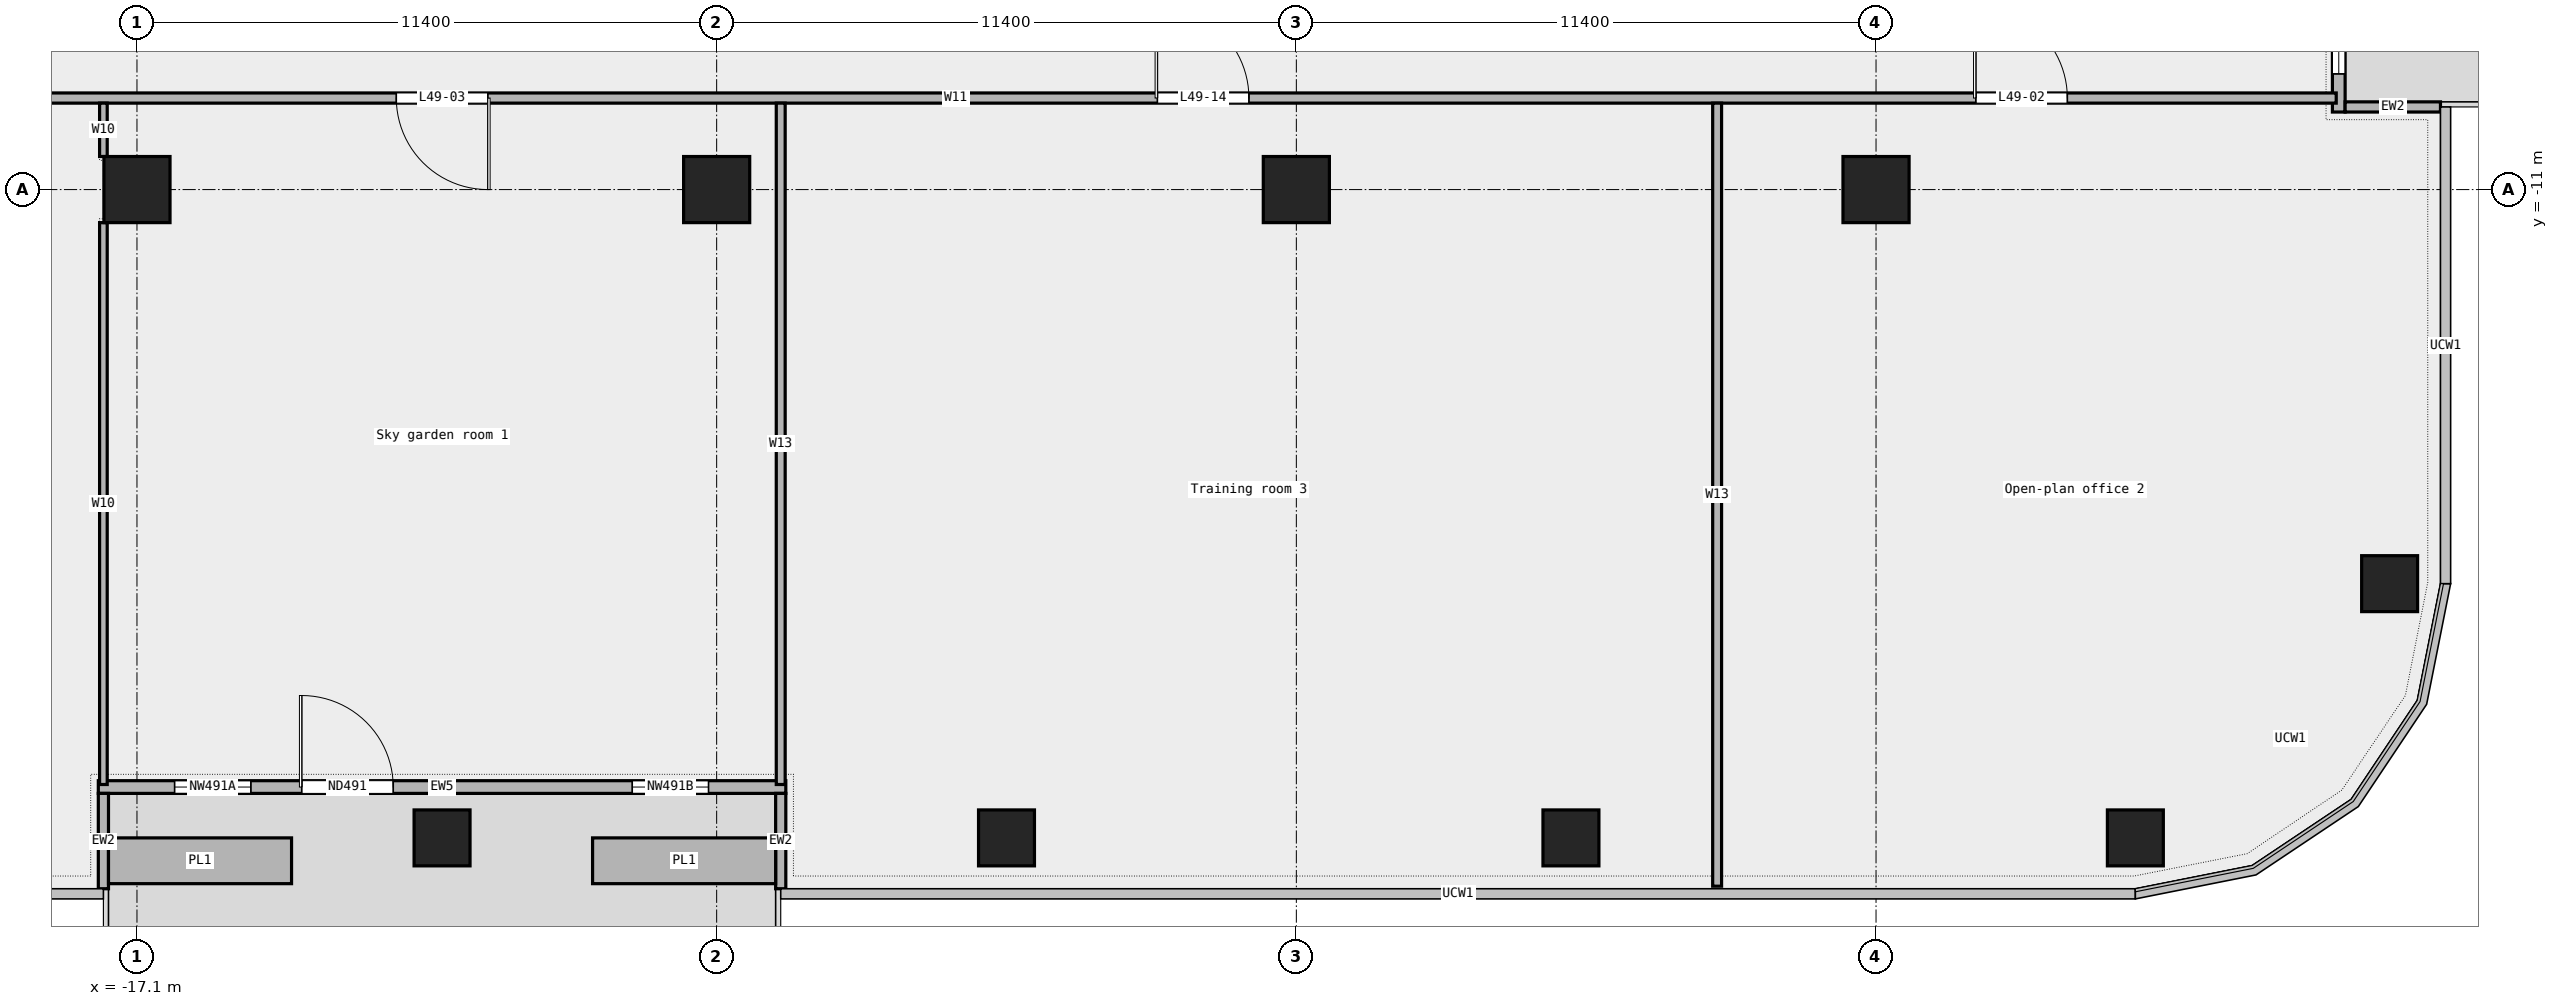
"""IFC4 building model, lengths in metres.
Left out: names, types, materials, properties, quantities, classifications, styles, units other than length and angle.
Written with IfcOpenShell. Run it as: python <this file> out.ifc"""

import sys

from ifc_helpers import new_model, si_unit, direction, frame, frame_2d, origin, origin_2d, place, context, subcontext, project, spatial, rectangle, extrude, element, fill, save


model = new_model("IFC4")
c1 = context("Model", 3, precision=1e-05, world=origin(), true_north=direction((0.0, 1.0)))
c2 = subcontext(c1, "Body", "Model", "MODEL_VIEW")
j1 = project(units=[si_unit("LENGTHUNIT", "METRE"), si_unit("PLANEANGLEUNIT", "RADIAN")], contexts=[c1])
p1 = place(None, origin())
s1 = spatial("IfcSite", under=j1, at=p1, CompositionType="ELEMENT")
p2 = place(p1, origin())
s2 = spatial("IfcBuilding", under=s1, at=p2, CompositionType="ELEMENT")
p3 = place(p2, frame((0.0, 0.0, 231.0)))
s3 = spatial("IfcBuildingStorey", under=s2, at=p3, CompositionType="ELEMENT", Elevation=231.0)
for number, where, z_axis, x_axis in (
    (1, (-11.1, -23.75, 0.0), (0.0, 0.0, 1.0), (1.0, 0.0, 0.0)),
    (2, (0.0, -23.75, 0.0), (0.0, 0.0, 1.0), (1.0, 0.0, 0.0)),
    (3, (11.1, -23.75, 0.0), (0.0, 0.0, 1.0), (1.0, 0.0, 0.0)),
    (4, (22.2, -23.75, 0.0), (0.0, 0.0, 1.0), (1.0, 0.0, 0.0)),
    (5, (27.2, -18.75, 0.0), (0.0, 0.0, 1.0), (1.0, 0.0, 0.0)),
):
    element("IfcColumn", number, at=place(p3, frame(where, z_axis=z_axis, x_axis=x_axis)), inside=s3, PredefinedType="COLUMN", context=c2, shape_type="SweptSolid", body=[
        extrude(rectangle(XDim=1.1, YDim=1.1, at=origin_2d()), origin(), (0.0, 0.0, 1.0), 3.6),
    ])
for number, where, z_axis, x_axis in (
    (6, (-17.1, -11.0, 0.0), (0.0, 0.0, 1.0), (1.0, 0.0, 0.0)),
    (7, (-5.7, -11.0, 0.0), (0.0, 0.0, 1.0), (1.0, 0.0, 0.0)),
    (8, (5.7, -11.0, 0.0), (0.0, 0.0, 1.0), (1.0, 0.0, 0.0)),
    (9, (17.1, -11.0, 0.0), (0.0, 0.0, 1.0), (1.0, 0.0, 0.0)),
):
    element("IfcColumn", number, at=place(p3, frame(where, z_axis=z_axis, x_axis=x_axis)), inside=s3, PredefinedType="COLUMN", context=c2, shape_type="SweptSolid", body=[
        extrude(rectangle(XDim=1.3, YDim=1.3, at=origin_2d()), origin(), (0.0, 0.0, 1.0), 3.6),
    ])
p4 = place(p3, frame((-17.86, -22.75, 0.0), z_axis=(0.0, 0.0, 1.0), x_axis=(1.0, 0.0, 0.0)))
e10 = element("IfcWall", 10, at=p4, inside=s3, PredefinedType="STANDARD", context=c2, shape_type="SweptSolid", body=[
    extrude(rectangle(XDim=13.52, YDim=0.25, at=frame_2d((6.76, 0.0))), origin(), (0.0, 0.0, 1.0), 3.6),
])
p5 = place(p4, frame((1.5, 0.0, 0.45)))
e11 = element("IfcOpeningElement", 11, at=p5, cuts=e10, PredefinedType="OPENING", context=c2, shape_type="SweptSolid", body=[
    extrude(rectangle(XDim=1.5, YDim=2.4, at=frame_2d((0.75, 1.2))), frame((0.0, 0.137, 0.0), z_axis=(0.0, -1.0, 0.0), x_axis=(1.0, 0.0, 0.0)), (0.0, 0.0, 1.0), 0.274),
])
p6 = place(p4, frame((4.0, 0.0, 0.0)))
e12 = element("IfcOpeningElement", 12, at=p6, cuts=e10, PredefinedType="OPENING", context=c2, shape_type="SweptSolid", body=[
    extrude(rectangle(XDim=1.8, YDim=2.4, at=frame_2d((0.9, 1.2))), frame((0.0, 0.137, 0.0), z_axis=(0.0, -1.0, 0.0), x_axis=(1.0, 0.0, 0.0)), (0.0, 0.0, 1.0), 0.274),
])
p7 = place(p4, frame((10.5, 0.0, 0.45)))
e13 = element("IfcOpeningElement", 13, at=p7, cuts=e10, PredefinedType="OPENING", context=c2, shape_type="SweptSolid", body=[
    extrude(rectangle(XDim=1.5, YDim=2.4, at=frame_2d((0.75, 1.2))), frame((0.0, 0.137, 0.0), z_axis=(0.0, -1.0, 0.0), x_axis=(1.0, 0.0, 0.0)), (0.0, 0.0, 1.0), 0.274),
])
for number, where, z_axis, x_axis in (
    (14, (-17.76, -24.75, 0.0), (0.0, 0.0, 1.0), (0.0, 1.0, 0.0)),
    (15, (-4.44, -24.75, 0.0), (0.0, 0.0, 1.0), (0.0, 1.0, 0.0)),
):
    element("IfcWall", number, at=place(p3, frame(where, z_axis=z_axis, x_axis=x_axis)), inside=s3, PredefinedType="STANDARD", context=c2, shape_type="SweptSolid", body=[
        extrude(rectangle(XDim=1.875, YDim=0.2, at=frame_2d((0.938, 0.0))), origin(), (0.0, 0.0, 1.0), 3.6),
    ])
for number, where, z_axis, x_axis in (
    (16, (-17.66, -24.2, 0.0), (0.0, 0.0, 1.0), (1.0, 0.0, 0.0)),
    (17, (-8.14, -24.2, 0.0), (0.0, 0.0, 1.0), (1.0, 0.0, 0.0)),
):
    element("IfcWall", number, at=place(p3, frame(where, z_axis=z_axis, x_axis=x_axis)), inside=s3, PredefinedType="STANDARD", context=c2, shape_type="SweptSolid", body=[
        extrude(rectangle(XDim=3.6, YDim=0.9, at=frame_2d((1.8, 0.0))), origin(), (0.0, 0.0, 1.0), 0.7),
    ])
p8 = place(p3, frame((26.2, -9.475, 0.0), z_axis=(0.0, 0.0, 1.0), x_axis=(0.0, 1.0, 0.0)))
e18 = element("IfcWall", 18, at=p8, inside=s3, PredefinedType="STANDARD", context=c2, shape_type="SweptSolid", body=[
    extrude(rectangle(XDim=14.263, YDim=0.25, at=frame_2d((7.131, 0.0))), origin(), (0.0, 0.0, 1.0), 3.6),
])
p9 = place(p8, frame((0.75, 0.0, 0.45)))
e19 = element("IfcOpeningElement", 19, at=p9, cuts=e18, PredefinedType="OPENING", context=c2, shape_type="SweptSolid", body=[
    extrude(rectangle(XDim=1.5, YDim=2.4, at=frame_2d((0.75, 1.2))), frame((0.0, 0.137, 0.0), z_axis=(0.0, -1.0, 0.0), x_axis=(1.0, 0.0, 0.0)), (0.0, 0.0, 1.0), 0.274),
])
p10 = place(p8, frame((6.25, 0.0, 0.0)))
e20 = element("IfcOpeningElement", 20, at=p10, cuts=e18, PredefinedType="OPENING", context=c2, shape_type="SweptSolid", body=[
    extrude(rectangle(XDim=1.8, YDim=2.4, at=frame_2d((0.9, 1.2))), frame((0.0, 0.137, 0.0), z_axis=(0.0, -1.0, 0.0), x_axis=(1.0, 0.0, 0.0)), (0.0, 0.0, 1.0), 0.274),
])
p11 = place(p8, frame((11.0, 0.0, 0.45)))
e21 = element("IfcOpeningElement", 21, at=p11, cuts=e18, PredefinedType="OPENING", context=c2, shape_type="SweptSolid", body=[
    extrude(rectangle(XDim=1.5, YDim=2.4, at=frame_2d((0.75, 1.2))), frame((0.0, 0.137, 0.0), z_axis=(0.0, -1.0, 0.0), x_axis=(1.0, 0.0, 0.0)), (0.0, 0.0, 1.0), 0.274),
])
p12 = place(p3, frame((28.2, -9.375, 0.0), z_axis=(0.0, 0.0, 1.0), x_axis=(-1.0, 0.0, 0.0)))
e22 = element("IfcWall", 22, at=p12, inside=s3, PredefinedType="STANDARD", context=c2, shape_type="SweptSolid", body=[
    extrude(rectangle(XDim=1.875, YDim=0.2, at=frame_2d((0.938, 0.0))), origin(), (0.0, 0.0, 1.0), 3.6),
])
p13 = place(p3, frame((-28.15, -9.2, 0.0), z_axis=(0.0, 0.0, 1.0), x_axis=(1.0, 0.0, 0.0)))
e23 = element("IfcWall", 23, at=p13, inside=s3, PredefinedType="PARTITIONING", context=c2, shape_type="SweptSolid", body=[
    extrude(rectangle(XDim=54.3, YDim=0.2, at=frame_2d((27.15, 0.0))), origin(), (0.0, 0.0, 1.0), 3.6),
])
p14 = place(p13, frame((47.212, 0.0, 0.0)))
e24 = element("IfcOpeningElement", 24, at=p14, cuts=e23, PredefinedType="OPENING", context=c2, shape_type="SweptSolid", body=[
    extrude(rectangle(XDim=1.8, YDim=2.1, at=frame_2d((0.9, 1.05))), frame((0.0, 0.112, 0.0), z_axis=(0.0, -1.0, 0.0), x_axis=(1.0, 0.0, 0.0)), (0.0, 0.0, 1.0), 0.224),
])
p15 = place(p13, frame((16.15, 0.0, 0.0)))
e25 = element("IfcOpeningElement", 25, at=p15, cuts=e23, PredefinedType="OPENING", context=c2, shape_type="SweptSolid", body=[
    extrude(rectangle(XDim=1.8, YDim=2.1, at=frame_2d((0.9, 1.05))), frame((0.0, 0.112, 0.0), z_axis=(0.0, -1.0, 0.0), x_axis=(1.0, 0.0, 0.0)), (0.0, 0.0, 1.0), 0.224),
])
p16 = place(p13, frame((4.545, 0.0, 0.0)))
e26 = element("IfcOpeningElement", 26, at=p16, cuts=e23, PredefinedType="OPENING", context=c2, shape_type="SweptSolid", body=[
    extrude(rectangle(XDim=1.5, YDim=2.1, at=frame_2d((0.75, 1.05))), frame((0.0, 0.112, 0.0), z_axis=(0.0, -1.0, 0.0), x_axis=(1.0, 0.0, 0.0)), (0.0, 0.0, 1.0), 0.224),
])
p17 = place(p13, frame((31.117, 0.0, 0.0)))
e27 = element("IfcOpeningElement", 27, at=p17, cuts=e23, PredefinedType="OPENING", context=c2, shape_type="SweptSolid", body=[
    extrude(rectangle(XDim=1.8, YDim=2.1, at=frame_2d((0.9, 1.05))), frame((0.0, 0.112, 0.0), z_axis=(0.0, -1.0, 0.0), x_axis=(1.0, 0.0, 0.0)), (0.0, 0.0, 1.0), 0.224),
])
p18 = place(p3, frame((-17.76, -22.7, 0.0), z_axis=(0.0, 0.0, 1.0), x_axis=(0.0, 1.0, 0.0)))
e28 = element("IfcWall", 28, at=p18, inside=s3, PredefinedType="PARTITIONING", context=c2, shape_type="SweptSolid", body=[
    extrude(rectangle(XDim=11.05, YDim=0.15, at=frame_2d((5.525, 0.0))), origin(), (0.0, 0.0, 1.0), 3.6),
])
p19 = place(p3, frame((-17.76, -10.35, 0.0), z_axis=(0.0, 0.0, 1.0), x_axis=(0.0, 1.0, 0.0)))
e29 = element("IfcWall", 29, at=p19, inside=s3, PredefinedType="PARTITIONING", context=c2, shape_type="SweptSolid", body=[
    extrude(rectangle(XDim=1.05, YDim=0.15, at=frame_2d((0.525, 0.0))), origin(), (0.0, 0.0, 1.0), 3.6),
])
p20 = place(p3, frame((-4.44, -22.7, 0.0), z_axis=(0.0, 0.0, 1.0), x_axis=(0.0, 1.0, 0.0)))
e30 = element("IfcWall", 30, at=p20, inside=s3, PredefinedType="PARTITIONING", context=c2, shape_type="SweptSolid", body=[
    extrude(rectangle(XDim=13.4, YDim=0.175, at=frame_2d((6.7, 0.0))), origin(), (0.0, 0.0, 1.0), 3.6),
])
p21 = place(p3, frame((13.975, -24.7, 0.0), z_axis=(0.0, 0.0, 1.0), x_axis=(0.0, 1.0, 0.0)))
e31 = element("IfcWall", 31, at=p21, inside=s3, PredefinedType="PARTITIONING", context=c2, shape_type="SweptSolid", body=[
    extrude(rectangle(XDim=15.4, YDim=0.175, at=frame_2d((7.7, 0.0))), origin(), (0.0, 0.0, 1.0), 3.6),
])
p22 = place(p5, origin())
e32 = element("IfcWindow", 32, at=p22, inside=s3, PartitioningType="SINGLE_PANEL", PredefinedType="WINDOW", context=c2, shape_type="SweptSolid", body=[
    extrude(rectangle(XDim=1.5, YDim=2.4, at=frame_2d((0.75, 1.2))), frame((0.0, 0.03, 0.0), z_axis=(0.0, -1.0, 0.0), x_axis=(1.0, 0.0, 0.0)), (0.0, 0.0, 1.0), 0.06),
])
fill(e11, e32)
p23 = place(p6, origin())
e33 = element("IfcDoor", 33, at=p23, inside=s3, OperationType="DOUBLE_DOOR_SINGLE_SWING", PredefinedType="DOOR", context=c2, shape_type="SweptSolid", body=[
    extrude(rectangle(XDim=1.8, YDim=2.4, at=frame_2d((0.9, 1.2))), frame((0.0, 0.025, 0.0), z_axis=(0.0, -1.0, 0.0), x_axis=(1.0, 0.0, 0.0)), (0.0, 0.0, 1.0), 0.05),
])
fill(e12, e33)
p24 = place(p7, origin())
e34 = element("IfcWindow", 34, at=p24, inside=s3, PartitioningType="SINGLE_PANEL", PredefinedType="WINDOW", context=c2, shape_type="SweptSolid", body=[
    extrude(rectangle(XDim=1.5, YDim=2.4, at=frame_2d((0.75, 1.2))), frame((0.0, 0.03, 0.0), z_axis=(0.0, -1.0, 0.0), x_axis=(1.0, 0.0, 0.0)), (0.0, 0.0, 1.0), 0.06),
])
fill(e13, e34)
p25 = place(p9, origin())
e35 = element("IfcWindow", 35, at=p25, inside=s3, PartitioningType="SINGLE_PANEL", PredefinedType="WINDOW", context=c2, shape_type="SweptSolid", body=[
    extrude(rectangle(XDim=1.5, YDim=2.4, at=frame_2d((0.75, 1.2))), frame((0.0, 0.03, 0.0), z_axis=(0.0, -1.0, 0.0), x_axis=(1.0, 0.0, 0.0)), (0.0, 0.0, 1.0), 0.06),
])
fill(e19, e35)
p26 = place(p14, origin())
e36 = element("IfcDoor", 36, at=p26, inside=s3, OperationType="DOUBLE_DOOR_SINGLE_SWING", PredefinedType="DOOR", context=c2, shape_type="SweptSolid", body=[
    extrude(rectangle(XDim=1.8, YDim=2.1, at=frame_2d((0.9, 1.05))), frame((0.0, 0.025, 0.0), z_axis=(0.0, -1.0, 0.0), x_axis=(1.0, 0.0, 0.0)), (0.0, 0.0, 1.0), 0.05),
])
fill(e24, e36)
p27 = place(p15, origin())
e37 = element("IfcDoor", 37, at=p27, inside=s3, OperationType="DOUBLE_DOOR_SINGLE_SWING", PredefinedType="DOOR", context=c2, shape_type="SweptSolid", body=[
    extrude(rectangle(XDim=1.8, YDim=2.1, at=frame_2d((0.9, 1.05))), frame((0.0, 0.025, 0.0), z_axis=(0.0, -1.0, 0.0), x_axis=(1.0, 0.0, 0.0)), (0.0, 0.0, 1.0), 0.05),
])
fill(e25, e37)
p28 = place(p17, origin())
e38 = element("IfcDoor", 38, at=p28, inside=s3, OperationType="DOUBLE_DOOR_SINGLE_SWING", PredefinedType="DOOR", context=c2, shape_type="SweptSolid", body=[
    extrude(rectangle(XDim=1.8, YDim=2.1, at=frame_2d((0.9, 1.05))), frame((0.0, 0.025, 0.0), z_axis=(0.0, -1.0, 0.0), x_axis=(1.0, 0.0, 0.0)), (0.0, 0.0, 1.0), 0.05),
])
fill(e27, e38)
save(model, sys.argv[1])
